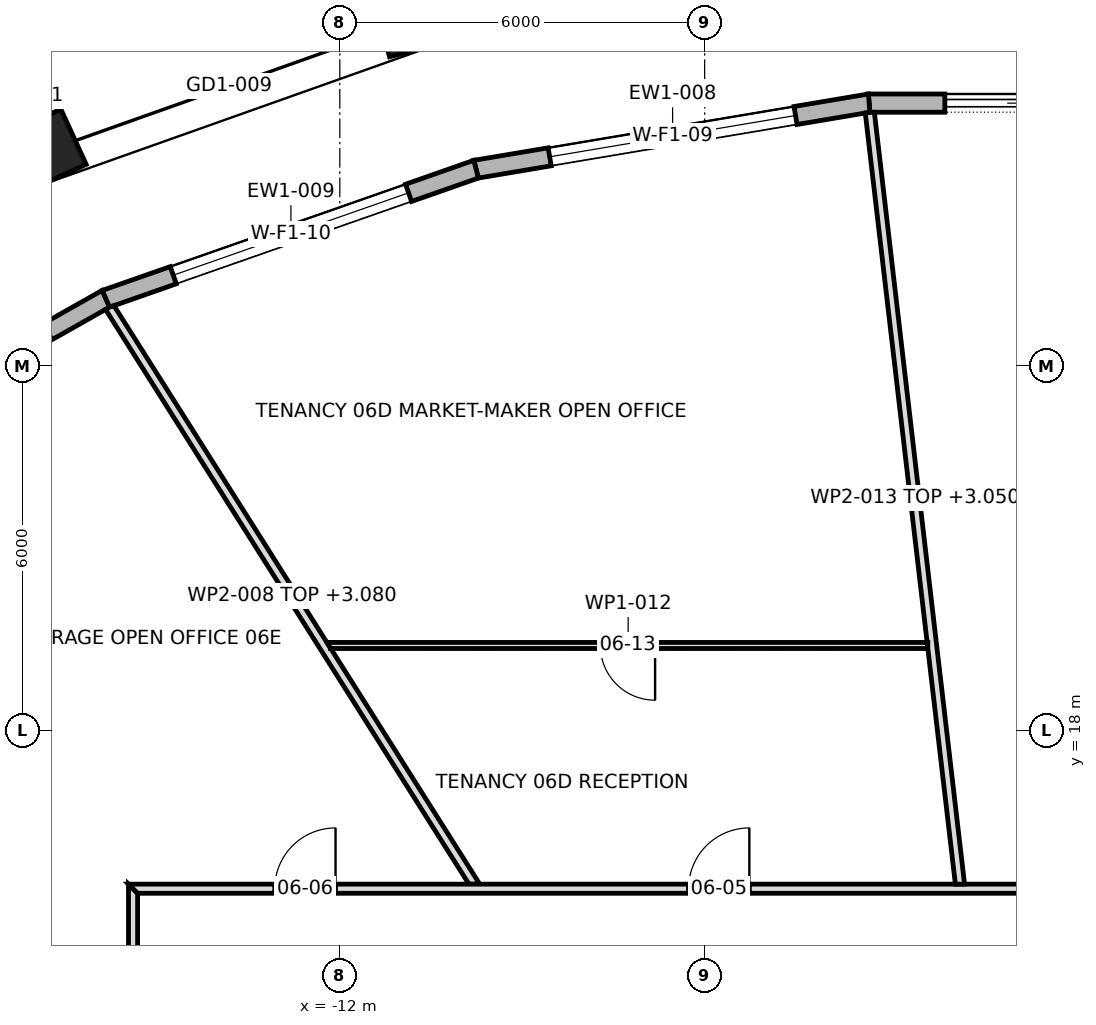
"""IFC4 building model, lengths in metres.
Left out: names, types, materials, properties, quantities, classifications, styles, units other than length and angle.
Written with IfcOpenShell. Run it as: python <this file> out.ifc"""

import sys

from ifc_helpers import new_model, si_unit, direction, frame, frame_2d, origin, origin_2d, place, context, subcontext, project, spatial, polyline, rectangle, outline, extrude, element, fill, save


model = new_model("IFC4")
c1 = context("Model", 3, precision=1e-05, world=origin(), true_north=direction((0.0, 1.0)))
c2 = subcontext(c1, "Body", "Model", "MODEL_VIEW")
j1 = project(units=[si_unit("LENGTHUNIT", "METRE"), si_unit("PLANEANGLEUNIT", "RADIAN")], contexts=[c1])
p1 = place(None, origin())
s1 = spatial("IfcSite", under=j1, at=p1, CompositionType="ELEMENT")
p2 = place(p1, origin())
s2 = spatial("IfcBuilding", under=s1, at=p2, CompositionType="ELEMENT")
p3 = place(p2, frame((0.0, 0.0, 86.5)))
s3 = spatial("IfcBuildingStorey", under=s2, at=p3, CompositionType="ELEMENT", Elevation=86.5)
for number, where, z_axis, x_axis in (
    (1, (-10.534, 29.766, 0.0), (0.0, 0.0, 1.0), (-0.968, -0.252, 0.0)),
    (2, (-17.107, 27.432, 0.0), (0.0, 0.0, 1.0), (-0.909, -0.417, 0.0)),
):
    element("IfcColumn", number, at=place(p3, frame(where, z_axis=z_axis, x_axis=x_axis)), inside=s3, PredefinedType="COLUMN", context=c2, shape_type="SweptSolid", body=[
        extrude(rectangle(XDim=1.6, YDim=1.0, at=origin_2d()), origin(), (0.0, 0.0, 1.0), 4.2),
    ])
p4 = place(p3, frame((3.295, 28.319, 0.0), z_axis=(0.0, 0.0, 1.0), x_axis=(-1.0, 0.0, 0.0)))
e3 = element("IfcWall", 3, at=p4, inside=s3, PredefinedType="STANDARD", context=c2, shape_type="SweptSolid", body=[
    extrude(outline(polyline([(-0.012, -0.15), (6.602, -0.15), (6.577, 0.15), (0.012, 0.15), (-0.012, -0.15)])), origin(), (0.0, 0.0, 1.0), 3.9),
])
p5 = place(p4, frame((1.245, 0.0, 0.0)))
e4 = element("IfcOpeningElement", 4, at=p5, cuts=e3, PredefinedType="OPENING", context=c2, shape_type="SweptSolid", body=[
    extrude(rectangle(XDim=4.1, YDim=3.45, at=frame_2d((2.05, 1.725))), frame((0.0, 0.162, 0.0), z_axis=(0.0, -1.0, 0.0), x_axis=(1.0, 0.0, 0.0)), (0.0, 0.0, 1.0), 0.324),
])
p6 = place(p3, frame((-3.295, 28.319, 0.0), z_axis=(0.0, 0.0, 1.0), x_axis=(-0.986162431544, -0.165781961053, 0.0)))
e5 = element("IfcWall", 5, at=p6, inside=s3, PredefinedType="STANDARD", context=c2, shape_type="SweptSolid", body=[
    extrude(outline(polyline([(-0.012, -0.15), (6.568, -0.15), (6.542, 0.15), (0.012, 0.15), (-0.012, -0.15)])), origin(), (0.0, 0.0, 1.0), 3.9),
])
p7 = place(p6, frame((1.227, 0.0, 0.6)))
e6 = element("IfcOpeningElement", 6, at=p7, cuts=e5, PredefinedType="OPENING", context=c2, shape_type="SweptSolid", body=[
    extrude(rectangle(XDim=4.1, YDim=2.85, at=frame_2d((2.05, 1.425))), frame((0.0, 0.162, 0.0), z_axis=(0.0, -1.0, 0.0), x_axis=(1.0, 0.0, 0.0)), (0.0, 0.0, 1.0), 0.324),
])
p8 = place(p3, frame((-9.759, 27.232, 0.0), z_axis=(0.0, 0.0, 1.0), x_axis=(-0.943820008365, -0.330459970057, 0.0)))
e7 = element("IfcWall", 7, at=p8, inside=s3, PredefinedType="STANDARD", context=c2, shape_type="SweptSolid", body=[
    extrude(outline(polyline([(-0.013, -0.15), (6.466, -0.15), (6.439, 0.15), (0.013, 0.15), (-0.013, -0.15)])), origin(), (0.0, 0.0, 1.0), 3.9),
])
p9 = place(p8, frame((1.176, 0.0, 0.6)))
e8 = element("IfcOpeningElement", 8, at=p9, cuts=e7, PredefinedType="OPENING", context=c2, shape_type="SweptSolid", body=[
    extrude(rectangle(XDim=4.1, YDim=2.85, at=frame_2d((2.05, 1.425))), frame((0.0, 0.162, 0.0), z_axis=(0.0, -1.0, 0.0), x_axis=(1.0, 0.0, 0.0)), (0.0, 0.0, 1.0), 0.324),
])
p10 = place(p3, frame((-15.849, 25.1, 0.0), z_axis=(0.0, 0.0, 1.0), x_axis=(-0.870737550302, -0.491748023376, 0.0)))
e9 = element("IfcWall", 9, at=p10, inside=s3, PredefinedType="STANDARD", context=c2, shape_type="SweptSolid", body=[
    extrude(outline(polyline([(-0.013, -0.15), (6.311, -0.15), (6.282, 0.15), (0.013, 0.15), (-0.013, -0.15)])), origin(), (0.0, 0.0, 1.0), 3.9),
])
p11 = place(p10, frame((1.098, 0.0, 0.6)))
e10 = element("IfcOpeningElement", 10, at=p11, cuts=e9, PredefinedType="OPENING", context=c2, shape_type="SweptSolid", body=[
    extrude(rectangle(XDim=4.1, YDim=2.85, at=frame_2d((2.05, 1.425))), frame((0.0, 0.162, 0.0), z_axis=(0.0, -1.0, 0.0), x_axis=(1.0, 0.0, 0.0)), (0.0, 0.0, 1.0), 0.324),
])
p12 = place(p3, frame((-25.888, 17.962, 0.0), z_axis=(0.0, 0.0, 1.0), x_axis=(0.821411896375, -0.570335424547, 0.0)))
e11 = element("IfcWall", 11, at=p12, inside=s3, PredefinedType="PARTITIONING", context=c2, shape_type="SweptSolid", body=[
    extrude(outline(polyline([(0.0, -0.075), (1.601, -0.075), (3.202, -0.075), (4.803, -0.075), (6.405, -0.075), (8.006, -0.075), (8.01, -0.072), (8.012, -0.075), (9.584, -0.075), (11.157, -0.075), (12.729, -0.075), (12.729, -0.074), (12.679, -0.002), (12.679, -0.002), (12.625, 0.075), (10.825, 0.075), (9.025, 0.075), (7.225, 0.075), (5.425, 0.075), (3.625, 0.075), (1.825, 0.075), (0.025, 0.075), (0.004, -0.004), (0.0, -0.067), (0.0, -0.075)])), origin(), (0.0, 0.0, 1.0), 2.86),
])
p13 = place(p3, frame((-15.789, 24.966, 0.0), z_axis=(0.0, 0.0, 1.0), x_axis=(0.53447919721, -0.845181630036, 0.0)))
e12 = element("IfcWall", 12, at=p13, inside=s3, PredefinedType="PARTITIONING", context=c2, shape_type="SweptSolid", body=[
    extrude(outline(polyline([(0.0, -0.075), (1.864, -0.075), (3.727, -0.075), (5.591, -0.075), (7.455, -0.075), (9.318, -0.075), (11.182, -0.075), (11.277, 0.075), (11.277, 0.075), (9.748, 0.075), (8.22, 0.075), (6.692, 0.075), (6.69, 0.072), (6.686, 0.075), (5.02, 0.075), (3.353, 0.075), (1.687, 0.075), (0.021, 0.075), (0.004, 0.001), (0.0, -0.073), (0.0, -0.075)])), origin(), (0.0, 0.0, 1.0), 3.08),
])
p14 = place(p3, frame((-15.4, -15.475, 0.0), z_axis=(0.0, 0.0, 1.0), x_axis=(0.0, 1.0, 0.0)))
e13 = element("IfcWall", 13, at=p14, inside=s3, PredefinedType="PARTITIONING", context=c2, shape_type="SweptSolid", body=[
    extrude(outline(polyline([(0.15, -0.075), (2.066, -0.075), (3.981, -0.075), (5.897, -0.075), (7.812, -0.075), (9.728, -0.075), (11.644, -0.075), (13.56, -0.075), (15.475, -0.075), (17.391, -0.075), (19.306, -0.075), (21.222, -0.075), (23.138, -0.075), (25.053, -0.075), (26.969, -0.075), (28.885, -0.075), (30.8, -0.075), (30.95, 0.075), (29.016, 0.075), (27.081, 0.075), (25.147, 0.075), (23.212, 0.075), (21.278, 0.075), (19.344, 0.075), (17.409, 0.075), (15.475, 0.075), (13.541, 0.075), (11.606, 0.075), (9.672, 0.075), (7.738, 0.075), (5.803, 0.075), (3.869, 0.075), (1.935, 0.075), (0.0, 0.075), (0.15, -0.075)])), origin(), (0.0, 0.0, 1.0), 3.9),
])
p15 = place(p14, frame((19.675, 0.0, 0.0)))
e14 = element("IfcOpeningElement", 14, at=p15, cuts=e13, PredefinedType="OPENING", context=c2, shape_type="SweptSolid", body=[
    extrude(rectangle(XDim=1.0, YDim=2.1, at=frame_2d((0.5, 1.05))), frame((0.0, 0.087, 0.0), z_axis=(0.0, -1.0, 0.0), x_axis=(1.0, 0.0, 0.0)), (0.0, 0.0, 1.0), 0.174),
])
p16 = place(p14, frame((10.855, 0.0, 0.0)))
e15 = element("IfcOpeningElement", 15, at=p16, cuts=e13, PredefinedType="OPENING", context=c2, shape_type="SweptSolid", body=[
    extrude(rectangle(XDim=1.0, YDim=2.1, at=frame_2d((0.5, 1.05))), frame((0.0, 0.087, 0.0), z_axis=(0.0, -1.0, 0.0), x_axis=(1.0, 0.0, 0.0)), (0.0, 0.0, 1.0), 0.174),
])
p17 = place(p3, frame((-15.475, 15.4, 0.0), z_axis=(0.0, 0.0, 1.0), x_axis=(1.0, 0.0, 0.0)))
e16 = element("IfcWall", 16, at=p17, inside=s3, PredefinedType="PARTITIONING", context=c2, shape_type="SweptSolid", body=[
    extrude(outline(polyline([(0.15, -0.075), (2.066, -0.075), (3.981, -0.075), (5.897, -0.075), (7.812, -0.075), (9.728, -0.075), (11.644, -0.075), (13.56, -0.075), (15.475, -0.075), (17.391, -0.075), (19.306, -0.075), (21.222, -0.075), (23.138, -0.075), (25.053, -0.075), (26.969, -0.075), (28.885, -0.075), (30.8, -0.075), (30.95, 0.075), (29.016, 0.075), (27.081, 0.075), (25.147, 0.075), (23.212, 0.075), (21.278, 0.075), (19.344, 0.075), (17.409, 0.075), (15.475, 0.075), (13.541, 0.075), (11.606, 0.075), (9.672, 0.075), (7.738, 0.075), (5.803, 0.075), (3.869, 0.075), (1.935, 0.075), (0.0, 0.075), (0.15, -0.075)])), origin(), (0.0, 0.0, 1.0), 3.9),
])
p18 = place(p17, frame((21.155, 0.0, 0.0)))
e17 = element("IfcOpeningElement", 17, at=p18, cuts=e16, PredefinedType="OPENING", context=c2, shape_type="SweptSolid", body=[
    extrude(rectangle(XDim=1.8, YDim=2.1, at=frame_2d((0.9, 1.05))), frame((0.0, 0.087, 0.0), z_axis=(0.0, -1.0, 0.0), x_axis=(1.0, 0.0, 0.0)), (0.0, 0.0, 1.0), 0.174),
])
p19 = place(p17, frame((9.21, 0.0, 0.0)))
e18 = element("IfcOpeningElement", 18, at=p19, cuts=e16, PredefinedType="OPENING", context=c2, shape_type="SweptSolid", body=[
    extrude(rectangle(XDim=1.0, YDim=2.1, at=frame_2d((0.5, 1.05))), frame((0.0, 0.087, 0.0), z_axis=(0.0, -1.0, 0.0), x_axis=(1.0, 0.0, 0.0)), (0.0, 0.0, 1.0), 0.174),
])
p20 = place(p17, frame((2.405, 0.0, 0.0)))
e19 = element("IfcOpeningElement", 19, at=p20, cuts=e16, PredefinedType="OPENING", context=c2, shape_type="SweptSolid", body=[
    extrude(rectangle(XDim=1.0, YDim=2.1, at=frame_2d((0.5, 1.05))), frame((0.0, 0.087, 0.0), z_axis=(0.0, -1.0, 0.0), x_axis=(1.0, 0.0, 0.0)), (0.0, 0.0, 1.0), 0.174),
])
p21 = place(p3, frame((-12.212, 19.4, 0.0), z_axis=(0.0, 0.0, 1.0), x_axis=(1.0, 0.0, 0.0)))
e20 = element("IfcWall", 20, at=p21, inside=s3, PredefinedType="PARTITIONING", context=c2, shape_type="SweptSolid", body=[
    extrude(outline(polyline([(9.882, -0.05), (9.882, -0.047), (9.871, 0.05), (7.896, 0.05), (5.922, 0.05), (3.948, 0.05), (1.974, 0.05), (0.0, 0.05), (0.0, 0.049), (0.063, -0.05), (2.027, -0.05), (3.99, -0.05), (5.954, -0.05), (7.918, -0.05), (9.882, -0.05)])), origin(), (0.0, 0.0, 1.0), 3.9),
])
p22 = place(p21, frame((4.497, 0.0, 0.0)))
e21 = element("IfcOpeningElement", 21, at=p22, cuts=e20, PredefinedType="OPENING", context=c2, shape_type="SweptSolid", body=[
    extrude(rectangle(XDim=0.9, YDim=2.1, at=frame_2d((0.45, 1.05))), frame((0.0, 0.062, 0.0), z_axis=(0.0, -1.0, 0.0), x_axis=(1.0, 0.0, 0.0)), (0.0, 0.0, 1.0), 0.124),
])
p23 = place(p3, frame((-3.284, 28.165, 0.0), z_axis=(0.0, 0.0, 1.0), x_axis=(0.116072244208, -0.993240773491, 0.0)))
e22 = element("IfcWall", 22, at=p23, inside=s3, PredefinedType="PARTITIONING", context=c2, shape_type="SweptSolid", body=[
    extrude(outline(polyline([(0.0, -0.075), (1.753, -0.075), (3.506, -0.075), (5.259, -0.075), (7.012, -0.075), (8.765, -0.075), (8.766, -0.064), (8.862, -0.075), (10.814, -0.075), (12.767, -0.075), (12.784, 0.071), (12.784, 0.075), (10.958, 0.075), (9.133, 0.075), (7.307, 0.075), (5.481, 0.075), (3.656, 0.075), (1.83, 0.075), (0.004, 0.075), (0.0, 0.038), (0.0, -0.075)])), origin(), (0.0, 0.0, 1.0), 3.05),
])
p24 = place(p5, origin())
e23 = element("IfcDoor", 23, at=p24, inside=s3, OperationType="DOUBLE_DOOR_SLIDING", PredefinedType="DOOR", context=c2, shape_type="SweptSolid", body=[
    extrude(rectangle(XDim=4.1, YDim=3.45, at=frame_2d((2.05, 1.725))), frame((0.0, 0.025, 0.0), z_axis=(0.0, -1.0, 0.0), x_axis=(1.0, 0.0, 0.0)), (0.0, 0.0, 1.0), 0.05),
])
fill(e4, e23)
p25 = place(p7, origin())
e24 = element("IfcWindow", 24, at=p25, inside=s3, PartitioningType="TRIPLE_PANEL_VERTICAL", PredefinedType="WINDOW", context=c2, shape_type="SweptSolid", body=[
    extrude(rectangle(XDim=4.1, YDim=2.85, at=frame_2d((2.05, 1.425))), frame((0.0, 0.03, 0.0), z_axis=(0.0, -1.0, 0.0), x_axis=(1.0, 0.0, 0.0)), (0.0, 0.0, 1.0), 0.06),
])
fill(e6, e24)
p26 = place(p9, origin())
e25 = element("IfcWindow", 25, at=p26, inside=s3, PartitioningType="TRIPLE_PANEL_VERTICAL", PredefinedType="WINDOW", context=c2, shape_type="SweptSolid", body=[
    extrude(rectangle(XDim=4.1, YDim=2.85, at=frame_2d((2.05, 1.425))), frame((0.0, 0.03, 0.0), z_axis=(0.0, -1.0, 0.0), x_axis=(1.0, 0.0, 0.0)), (0.0, 0.0, 1.0), 0.06),
])
fill(e8, e25)
p27 = place(p19, origin())
e26 = element("IfcDoor", 26, at=p27, inside=s3, OperationType="SINGLE_SWING_LEFT", PredefinedType="DOOR", context=c2, shape_type="SweptSolid", body=[
    extrude(rectangle(XDim=1.0, YDim=2.1, at=frame_2d((0.5, 1.05))), frame((0.0, 0.025, 0.0), z_axis=(0.0, -1.0, 0.0), x_axis=(1.0, 0.0, 0.0)), (0.0, 0.0, 1.0), 0.05),
])
fill(e18, e26)
p28 = place(p20, origin())
e27 = element("IfcDoor", 27, at=p28, inside=s3, OperationType="SINGLE_SWING_LEFT", PredefinedType="DOOR", context=c2, shape_type="SweptSolid", body=[
    extrude(rectangle(XDim=1.0, YDim=2.1, at=frame_2d((0.5, 1.05))), frame((0.0, 0.025, 0.0), z_axis=(0.0, -1.0, 0.0), x_axis=(1.0, 0.0, 0.0)), (0.0, 0.0, 1.0), 0.05),
])
fill(e19, e27)
p29 = place(p22, frame((0.9, 0.0, 0.0), z_axis=(0.0, 0.0, 1.0), x_axis=(-1.0, 0.0, 0.0)))
e28 = element("IfcDoor", 28, at=p29, inside=s3, OperationType="SINGLE_SWING_RIGHT", PredefinedType="DOOR", context=c2, shape_type="SweptSolid", body=[
    extrude(rectangle(XDim=0.9, YDim=2.1, at=frame_2d((0.45, 1.05))), frame((0.0, 0.025, 0.0), z_axis=(0.0, -1.0, 0.0), x_axis=(1.0, 0.0, 0.0)), (0.0, 0.0, 1.0), 0.05),
])
fill(e21, e28)
save(model, sys.argv[1])
